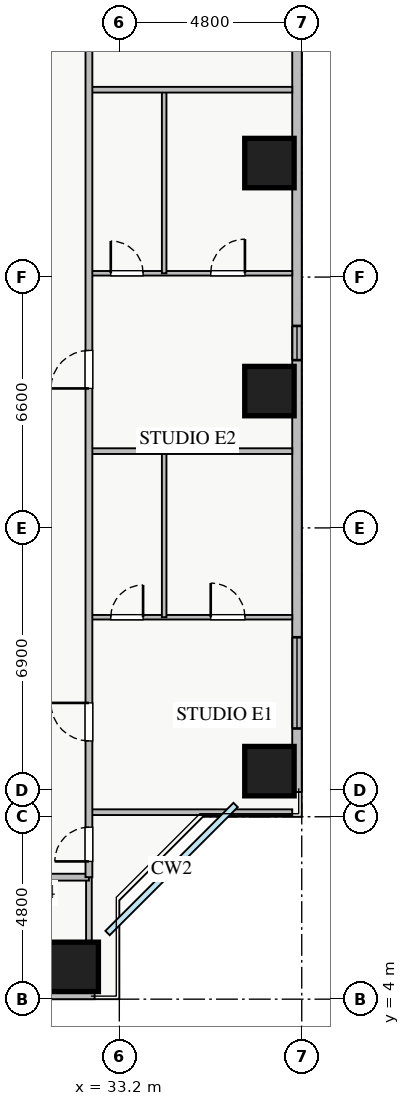
"""IFC4 building model, lengths in metres.
Left out: names, types, materials, properties, quantities, classifications, styles, units other than length and angle.
Written with IfcOpenShell. Run it as: python <this file> out.ifc"""

import sys

from ifc_helpers import new_model, si_unit, direction, frame, frame_2d, origin, origin_2d, place, context, subcontext, project, spatial, rectangle, extrude, source, transform, mapped, element, fill, save


model = new_model("IFC4")
c1 = context("Model", 3, precision=1e-05, world=origin(), true_north=direction((0.0, 1.0)))
c2 = subcontext(c1, "Body", "Model", "MODEL_VIEW")
j1 = project(units=[si_unit("LENGTHUNIT", "METRE"), si_unit("PLANEANGLEUNIT", "RADIAN")], contexts=[c1])
p1 = place(None, origin())
s1 = spatial("IfcSite", under=j1, at=p1, CompositionType="ELEMENT")
p2 = place(p1, origin())
s2 = spatial("IfcBuilding", under=s1, at=p2, CompositionType="ELEMENT")
p3 = place(p2, frame((0.0, 0.0, 50.25)))
s3 = spatial("IfcBuildingStorey", under=s2, at=p3, CompositionType="ELEMENT", Elevation=50.25)
m1 = source(origin(), c2, "Body", "SweptSolid", [
    extrude(rectangle(XDim=1.3, YDim=1.3, at=origin_2d()), origin(), (0.0, 0.0, 1.0), 3.25),
])
for number, where, z_axis, x_axis in (
    (1, (32.0, 4.85, 0.0), (0.0, 0.0, 1.0), (1.0, 0.0, 0.0)),
    (2, (37.15, 10.0, 0.0), (0.0, 0.0, 1.0), (1.0, 0.0, 0.0)),
    (3, (37.15, 20.0, 0.0), (0.0, 0.0, 1.0), (1.0, 0.0, 0.0)),
    (4, (37.15, 26.0, 0.0), (0.0, 0.0, 1.0), (1.0, 0.0, 0.0)),
):
    element("IfcColumn", number, at=place(p3, frame(where, z_axis=z_axis, x_axis=x_axis)), inside=s3, PredefinedType="COLUMN", context=c2, shape_type="MappedRepresentation", body=[
        mapped(m1, transform((0.0, 0.0, 0.0), x_axis=(1.0, 0.0, 0.0), y_axis=(0.0, 1.0, 0.0), z_axis=(0.0, 0.0, 1.0), scale=1.0)),
    ])
p4 = place(p3, frame((5.45, 4.125, 0.0), z_axis=(0.0, 0.0, 1.0), x_axis=(1.0, 0.0, 0.0)))
e5 = element("IfcWall", 5, at=p4, inside=s3, PredefinedType="STANDARD", context=c2, shape_type="SweptSolid", body=[
    extrude(rectangle(XDim=27.1, YDim=0.25, at=frame_2d((13.55, 0.0))), origin(), (0.0, 0.0, 1.0), 2.61),
])
p5 = place(p4, frame((14.4, 0.0, 0.0)))
e6 = element("IfcOpeningElement", 6, at=p5, cuts=e5, PredefinedType="OPENING", context=c2, shape_type="SweptSolid", body=[
    extrude(rectangle(XDim=1.2, YDim=2.1, at=frame_2d((0.6, 1.05))), frame((0.0, 0.135, 0.0), z_axis=(0.0, -1.0, 0.0), x_axis=(1.0, 0.0, 0.0)), (0.0, 0.0, 1.0), 0.27),
])
p6 = place(p4, frame((1.5, 0.0, 0.9)))
e7 = element("IfcOpeningElement", 7, at=p6, cuts=e5, PredefinedType="OPENING", context=c2, shape_type="SweptSolid", body=[
    extrude(rectangle(XDim=1.5, YDim=1.5, at=frame_2d((0.75, 0.75))), frame((0.0, 0.135, 0.0), z_axis=(0.0, -1.0, 0.0), x_axis=(1.0, 0.0, 0.0)), (0.0, 0.0, 1.0), 0.27),
])
p7 = place(p4, frame((9.263, 0.0, 0.9)))
e8 = element("IfcOpeningElement", 8, at=p7, cuts=e5, PredefinedType="OPENING", context=c2, shape_type="SweptSolid", body=[
    extrude(rectangle(XDim=1.8, YDim=1.45, at=frame_2d((0.9, 0.725))), frame((0.0, 0.135, 0.0), z_axis=(0.0, -1.0, 0.0), x_axis=(1.0, 0.0, 0.0)), (0.0, 0.0, 1.0), 0.27),
])
p8 = place(p4, frame((17.95, 0.0, 0.9)))
e9 = element("IfcOpeningElement", 9, at=p8, cuts=e5, PredefinedType="OPENING", context=c2, shape_type="SweptSolid", body=[
    extrude(rectangle(XDim=1.5, YDim=1.5, at=frame_2d((0.75, 0.75))), frame((0.0, 0.135, 0.0), z_axis=(0.0, -1.0, 0.0), x_axis=(1.0, 0.0, 0.0)), (0.0, 0.0, 1.0), 0.27),
])
p9 = place(p4, frame((22.663, 0.0, 0.9)))
e10 = element("IfcOpeningElement", 10, at=p9, cuts=e5, PredefinedType="OPENING", context=c2, shape_type="SweptSolid", body=[
    extrude(rectangle(XDim=2.1, YDim=1.48, at=frame_2d((1.05, 0.74))), frame((0.0, 0.135, 0.0), z_axis=(0.0, -1.0, 0.0), x_axis=(1.0, 0.0, 0.0)), (0.0, 0.0, 1.0), 0.27),
])
p10 = place(p4, frame((4.71, 0.0, 0.9)))
e11 = element("IfcOpeningElement", 11, at=p10, cuts=e5, PredefinedType="OPENING", context=c2, shape_type="SweptSolid", body=[
    extrude(rectangle(XDim=2.4, YDim=1.5, at=frame_2d((1.2, 0.75))), frame((0.0, 0.135, 0.0), z_axis=(0.0, -1.0, 0.0), x_axis=(1.0, 0.0, 0.0)), (0.0, 0.0, 1.0), 0.27),
])
p11 = place(p3, frame((37.875, 9.45, 0.0), z_axis=(0.0, 0.0, 1.0), x_axis=(0.0, 1.0, 0.0)))
e12 = element("IfcWall", 12, at=p11, inside=s3, PredefinedType="STANDARD", context=c2, shape_type="SweptSolid", body=[
    extrude(rectangle(XDim=27.1, YDim=0.25, at=frame_2d((13.55, 0.0))), origin(), (0.0, 0.0, 1.0), 2.61),
])
p12 = place(p11, frame((1.673, 0.0, 0.9)))
e13 = element("IfcOpeningElement", 13, at=p12, cuts=e12, PredefinedType="OPENING", context=c2, shape_type="SweptSolid", body=[
    extrude(rectangle(XDim=2.4, YDim=1.5, at=frame_2d((1.2, 0.75))), frame((0.0, 0.135, 0.0), z_axis=(0.0, -1.0, 0.0), x_axis=(1.0, 0.0, 0.0)), (0.0, 0.0, 1.0), 0.27),
])
p13 = place(p11, frame((23.788, 0.0, 0.9)))
e14 = element("IfcOpeningElement", 14, at=p13, cuts=e12, PredefinedType="OPENING", context=c2, shape_type="SweptSolid", body=[
    extrude(rectangle(XDim=1.8, YDim=1.5, at=frame_2d((0.9, 0.75))), frame((0.0, 0.135, 0.0), z_axis=(0.0, -1.0, 0.0), x_axis=(1.0, 0.0, 0.0)), (0.0, 0.0, 1.0), 0.27),
])
p14 = place(p11, frame((19.758, 0.0, 0.9)))
e15 = element("IfcOpeningElement", 15, at=p14, cuts=e12, PredefinedType="OPENING", context=c2, shape_type="SweptSolid", body=[
    extrude(rectangle(XDim=2.4, YDim=1.5, at=frame_2d((1.2, 0.75))), frame((0.0, 0.135, 0.0), z_axis=(0.0, -1.0, 0.0), x_axis=(1.0, 0.0, 0.0)), (0.0, 0.0, 1.0), 0.27),
])
p15 = place(p11, frame((11.365, 0.0, 0.9)))
e16 = element("IfcOpeningElement", 16, at=p15, cuts=e12, PredefinedType="OPENING", context=c2, shape_type="SweptSolid", body=[
    extrude(rectangle(XDim=0.9, YDim=1.2, at=frame_2d((0.45, 0.6))), frame((0.0, 0.135, 0.0), z_axis=(0.0, -1.0, 0.0), x_axis=(1.0, 0.0, 0.0)), (0.0, 0.0, 1.0), 0.27),
])
p16 = place(p3, frame((32.4, 4.25, 0.0), z_axis=(0.0, 0.0, 1.0), x_axis=(0.0, 1.0, 0.0)))
e17 = element("IfcWall", 17, at=p16, inside=s3, PredefinedType="PARTITIONING", context=c2, shape_type="SweptSolid", body=[
    extrude(rectangle(XDim=2.96, YDim=0.15, at=frame_2d((1.48, 0.0))), origin(), (0.0, 0.0, 1.0), 3.07),
])
p17 = place(p3, frame((8.82, 7.21, 0.0), z_axis=(0.0, 0.0, 1.0), x_axis=(1.0, 0.0, 0.0)))
e18 = element("IfcWall", 18, at=p17, inside=s3, PredefinedType="PARTITIONING", context=c2, shape_type="SweptSolid", body=[
    extrude(rectangle(XDim=23.58, YDim=0.18, at=frame_2d((11.79, 0.0))), origin(), (0.0, 0.0, 1.0), 3.07),
])
p18 = place(p17, frame((2.04, 0.0, 0.0)))
e19 = element("IfcOpeningElement", 19, at=p18, cuts=e18, PredefinedType="OPENING", context=c2, shape_type="SweptSolid", body=[
    extrude(rectangle(XDim=1.0, YDim=2.05, at=frame_2d((0.5, 1.025))), frame((0.0, 0.1, 0.0), z_axis=(0.0, -1.0, 0.0), x_axis=(1.0, 0.0, 0.0)), (0.0, 0.0, 1.0), 0.2),
])
p19 = place(p17, frame((8.53, 0.0, 0.0)))
e20 = element("IfcOpeningElement", 20, at=p19, cuts=e18, PredefinedType="OPENING", context=c2, shape_type="SweptSolid", body=[
    extrude(rectangle(XDim=1.0, YDim=2.05, at=frame_2d((0.5, 1.025))), frame((0.0, 0.1, 0.0), z_axis=(0.0, -1.0, 0.0), x_axis=(1.0, 0.0, 0.0)), (0.0, 0.0, 1.0), 0.2),
])
p20 = place(p17, frame((14.83, 0.0, 0.0)))
e21 = element("IfcOpeningElement", 21, at=p20, cuts=e18, PredefinedType="OPENING", context=c2, shape_type="SweptSolid", body=[
    extrude(rectangle(XDim=1.0, YDim=2.05, at=frame_2d((0.5, 1.025))), frame((0.0, 0.1, 0.0), z_axis=(0.0, -1.0, 0.0), x_axis=(1.0, 0.0, 0.0)), (0.0, 0.0, 1.0), 0.2),
])
p21 = place(p17, frame((20.13, 0.0, 0.0)))
e22 = element("IfcOpeningElement", 22, at=p21, cuts=e18, PredefinedType="OPENING", context=c2, shape_type="SweptSolid", body=[
    extrude(rectangle(XDim=1.0, YDim=2.05, at=frame_2d((0.5, 1.025))), frame((0.0, 0.1, 0.0), z_axis=(0.0, -1.0, 0.0), x_axis=(1.0, 0.0, 0.0)), (0.0, 0.0, 1.0), 0.2),
])
p22 = place(p3, frame((32.4, 8.92, 0.0), z_axis=(0.0, 0.0, 1.0), x_axis=(1.0, 0.0, 0.0)))
e23 = element("IfcWall", 23, at=p22, inside=s3, PredefinedType="PARTITIONING", context=c2, shape_type="SweptSolid", body=[
    extrude(rectangle(XDim=5.35, YDim=0.15, at=frame_2d((2.675, 0.0))), origin(), (0.0, 0.0, 1.0), 3.07),
])
p23 = place(p3, frame((32.4, 14.05, 0.0), z_axis=(0.0, 0.0, 1.0), x_axis=(1.0, 0.0, 0.0)))
e24 = element("IfcWall", 24, at=p23, inside=s3, PredefinedType="PLUMBINGWALL", context=c2, shape_type="SweptSolid", body=[
    extrude(rectangle(XDim=5.35, YDim=0.12, at=frame_2d((2.675, 0.0))), origin(), (0.0, 0.0, 1.0), 3.07),
])
p24 = place(p23, frame((0.575, 0.0, 0.0)))
e25 = element("IfcOpeningElement", 25, at=p24, cuts=e24, PredefinedType="OPENING", context=c2, shape_type="SweptSolid", body=[
    extrude(rectangle(XDim=0.85, YDim=2.05, at=frame_2d((0.425, 1.025))), frame((0.0, 0.07, 0.0), z_axis=(0.0, -1.0, 0.0), x_axis=(1.0, 0.0, 0.0)), (0.0, 0.0, 1.0), 0.14),
])
p25 = place(p23, frame((3.205, 0.0, 0.0)))
e26 = element("IfcOpeningElement", 26, at=p25, cuts=e24, PredefinedType="OPENING", context=c2, shape_type="SweptSolid", body=[
    extrude(rectangle(XDim=0.9, YDim=2.05, at=frame_2d((0.45, 1.025))), frame((0.0, 0.07, 0.0), z_axis=(0.0, -1.0, 0.0), x_axis=(1.0, 0.0, 0.0)), (0.0, 0.0, 1.0), 0.14),
])
p26 = place(p3, frame((34.38, 14.05, 0.0), z_axis=(0.0, 0.0, 1.0), x_axis=(0.0, 1.0, 0.0)))
e27 = element("IfcWall", 27, at=p26, inside=s3, PredefinedType="PLUMBINGWALL", context=c2, shape_type="SweptSolid", body=[
    extrude(rectangle(XDim=4.37, YDim=0.12, at=frame_2d((2.185, 0.0))), origin(), (0.0, 0.0, 1.0), 3.07),
])
p27 = place(p3, frame((32.4, 23.1, 0.0), z_axis=(0.0, 0.0, 1.0), x_axis=(1.0, 0.0, 0.0)))
e28 = element("IfcWall", 28, at=p27, inside=s3, PredefinedType="PLUMBINGWALL", context=c2, shape_type="SweptSolid", body=[
    extrude(rectangle(XDim=5.35, YDim=0.12, at=frame_2d((2.675, 0.0))), origin(), (0.0, 0.0, 1.0), 3.07),
])
p28 = place(p27, frame((0.575, 0.0, 0.0)))
e29 = element("IfcOpeningElement", 29, at=p28, cuts=e28, PredefinedType="OPENING", context=c2, shape_type="SweptSolid", body=[
    extrude(rectangle(XDim=0.85, YDim=2.05, at=frame_2d((0.425, 1.025))), frame((0.0, 0.07, 0.0), z_axis=(0.0, -1.0, 0.0), x_axis=(1.0, 0.0, 0.0)), (0.0, 0.0, 1.0), 0.14),
])
p29 = place(p27, frame((3.205, 0.0, 0.0)))
e30 = element("IfcOpeningElement", 30, at=p29, cuts=e28, PredefinedType="OPENING", context=c2, shape_type="SweptSolid", body=[
    extrude(rectangle(XDim=0.9, YDim=2.05, at=frame_2d((0.45, 1.025))), frame((0.0, 0.07, 0.0), z_axis=(0.0, -1.0, 0.0), x_axis=(1.0, 0.0, 0.0)), (0.0, 0.0, 1.0), 0.14),
])
p30 = place(p3, frame((34.38, 23.1, 0.0), z_axis=(0.0, 0.0, 1.0), x_axis=(0.0, 1.0, 0.0)))
e31 = element("IfcWall", 31, at=p30, inside=s3, PredefinedType="PLUMBINGWALL", context=c2, shape_type="SweptSolid", body=[
    extrude(rectangle(XDim=4.83, YDim=0.12, at=frame_2d((2.415, 0.0))), origin(), (0.0, 0.0, 1.0), 3.07),
])
for number, where, z_axis, x_axis in (
    (32, (32.4, 18.42, 0.0), (0.0, 0.0, 1.0), (1.0, 0.0, 0.0)),
    (33, (32.4, 27.93, 0.0), (0.0, 0.0, 1.0), (1.0, 0.0, 0.0)),
):
    element("IfcWall", number, at=place(p3, frame(where, z_axis=z_axis, x_axis=x_axis)), inside=s3, PredefinedType="PARTITIONING", context=c2, shape_type="SweptSolid", body=[
        extrude(rectangle(XDim=5.35, YDim=0.15, at=frame_2d((2.675, 0.0))), origin(), (0.0, 0.0, 1.0), 2.821),
    ])
p31 = place(p3, frame((32.4, 7.21, 0.0), z_axis=(0.0, 0.0, 1.0), x_axis=(0.0, 1.0, 0.0)))
e34 = element("IfcWall", 34, at=p31, inside=s3, PredefinedType="PARTITIONING", context=c2, shape_type="SweptSolid", body=[
    extrude(rectangle(XDim=31.23, YDim=0.18, at=frame_2d((15.615, 0.0))), origin(), (0.0, 0.0, 1.0), 2.765),
])
p32 = place(p31, frame((30.09, 0.0, 0.0)))
e35 = element("IfcOpeningElement", 35, at=p32, cuts=e34, PredefinedType="OPENING", context=c2, shape_type="SweptSolid", body=[
    extrude(rectangle(XDim=0.9, YDim=2.05, at=frame_2d((0.45, 1.025))), frame((0.0, 0.1, 0.0), z_axis=(0.0, -1.0, 0.0), x_axis=(1.0, 0.0, 0.0)), (0.0, 0.0, 1.0), 0.2),
])
p33 = place(p31, frame((0.415, 0.0, 0.0)))
e36 = element("IfcOpeningElement", 36, at=p33, cuts=e34, PredefinedType="OPENING", context=c2, shape_type="SweptSolid", body=[
    extrude(rectangle(XDim=0.9, YDim=2.05, at=frame_2d((0.45, 1.025))), frame((0.0, 0.1, 0.0), z_axis=(0.0, -1.0, 0.0), x_axis=(1.0, 0.0, 0.0)), (0.0, 0.0, 1.0), 0.2),
])
p34 = place(p31, frame((3.585, 0.0, 0.0)))
e37 = element("IfcOpeningElement", 37, at=p34, cuts=e34, PredefinedType="OPENING", context=c2, shape_type="SweptSolid", body=[
    extrude(rectangle(XDim=1.0, YDim=2.05, at=frame_2d((0.5, 1.025))), frame((0.0, 0.1, 0.0), z_axis=(0.0, -1.0, 0.0), x_axis=(1.0, 0.0, 0.0)), (0.0, 0.0, 1.0), 0.2),
])
p35 = place(p31, frame((12.86, 0.0, 0.0)))
e38 = element("IfcOpeningElement", 38, at=p35, cuts=e34, PredefinedType="OPENING", context=c2, shape_type="SweptSolid", body=[
    extrude(rectangle(XDim=1.0, YDim=2.05, at=frame_2d((0.5, 1.025))), frame((0.0, 0.1, 0.0), z_axis=(0.0, -1.0, 0.0), x_axis=(1.0, 0.0, 0.0)), (0.0, 0.0, 1.0), 0.2),
])
p36 = place(p31, frame((22.5, 0.0, 0.0)))
e39 = element("IfcOpeningElement", 39, at=p36, cuts=e34, PredefinedType="OPENING", context=c2, shape_type="SweptSolid", body=[
    extrude(rectangle(XDim=1.0, YDim=2.05, at=frame_2d((0.5, 1.025))), frame((0.0, 0.1, 0.0), z_axis=(0.0, -1.0, 0.0), x_axis=(1.0, 0.0, 0.0)), (0.0, 0.0, 1.0), 0.2),
])
m2 = source(origin(), c2, "Body", "SweptSolid", [
    extrude(rectangle(XDim=2.4, YDim=1.5, at=frame_2d((1.2, 0.75))), frame((0.0, 0.03, 0.0), z_axis=(0.0, -1.0, 0.0), x_axis=(1.0, 0.0, 0.0)), (0.0, 0.0, 1.0), 0.06),
])
p37 = place(p12, origin())
e40 = element("IfcWindow", 40, at=p37, inside=s3, PartitioningType="TRIPLE_PANEL_VERTICAL", PredefinedType="WINDOW", context=c2, shape_type="MappedRepresentation", body=[
    mapped(m2, transform((0.0, 0.0, 0.0), x_axis=(1.0, 0.0, 0.0), y_axis=(0.0, 1.0, 0.0), z_axis=(0.0, 0.0, 1.0), scale=1.0)),
])
fill(e13, e40)
m3 = source(origin(), c2, "Body", "SweptSolid", [
    extrude(rectangle(XDim=0.85, YDim=2.05, at=frame_2d((0.425, 1.025))), frame((0.0, 0.025, 0.0), z_axis=(0.0, -1.0, 0.0), x_axis=(1.0, 0.0, 0.0)), (0.0, 0.0, 1.0), 0.05),
])
p38 = place(p24, origin())
e41 = element("IfcDoor", 41, at=p38, inside=s3, OperationType="SINGLE_SWING_RIGHT", PredefinedType="DOOR", context=c2, shape_type="MappedRepresentation", body=[
    mapped(m3, transform((0.0, 0.0, 0.0), x_axis=(1.0, 0.0, 0.0), y_axis=(0.0, 1.0, 0.0), z_axis=(0.0, 0.0, 1.0), scale=1.0)),
])
fill(e25, e41)
m4 = source(origin(), c2, "Body", "SweptSolid", [
    extrude(rectangle(XDim=0.9, YDim=2.05, at=frame_2d((0.45, 1.025))), frame((0.0, 0.025, 0.0), z_axis=(0.0, -1.0, 0.0), x_axis=(1.0, 0.0, 0.0)), (0.0, 0.0, 1.0), 0.05),
])
p39 = place(p25, origin())
e42 = element("IfcDoor", 42, at=p39, inside=s3, OperationType="SINGLE_SWING_LEFT", PredefinedType="DOOR", context=c2, shape_type="MappedRepresentation", body=[
    mapped(m4, transform((0.0, 0.0, 0.0), x_axis=(1.0, 0.0, 0.0), y_axis=(0.0, 1.0, 0.0), z_axis=(0.0, 0.0, 1.0), scale=1.0)),
])
fill(e26, e42)
p40 = place(p28, origin())
e43 = element("IfcDoor", 43, at=p40, inside=s3, OperationType="SINGLE_SWING_LEFT", PredefinedType="DOOR", context=c2, shape_type="MappedRepresentation", body=[
    mapped(m3, transform((0.0, 0.0, 0.0), x_axis=(1.0, 0.0, 0.0), y_axis=(0.0, 1.0, 0.0), z_axis=(0.0, 0.0, 1.0), scale=1.0)),
])
fill(e29, e43)
p41 = place(p29, origin())
e44 = element("IfcDoor", 44, at=p41, inside=s3, OperationType="SINGLE_SWING_RIGHT", PredefinedType="DOOR", context=c2, shape_type="MappedRepresentation", body=[
    mapped(m4, transform((0.0, 0.0, 0.0), x_axis=(1.0, 0.0, 0.0), y_axis=(0.0, 1.0, 0.0), z_axis=(0.0, 0.0, 1.0), scale=1.0)),
])
fill(e30, e44)
p42 = place(p33, origin())
e45 = element("IfcDoor", 45, at=p42, inside=s3, OperationType="SINGLE_SWING_LEFT", PredefinedType="DOOR", context=c2, shape_type="MappedRepresentation", body=[
    mapped(m4, transform((0.0, 0.0, 0.0), x_axis=(1.0, 0.0, 0.0), y_axis=(0.0, 1.0, 0.0), z_axis=(0.0, 0.0, 1.0), scale=1.0)),
])
fill(e36, e45)
m5 = source(origin(), c2, "Body", "SweptSolid", [
    extrude(rectangle(XDim=1.0, YDim=2.05, at=frame_2d((0.5, 1.025))), frame((0.0, 0.025, 0.0), z_axis=(0.0, -1.0, 0.0), x_axis=(1.0, 0.0, 0.0)), (0.0, 0.0, 1.0), 0.05),
])
p43 = place(p34, origin())
e46 = element("IfcDoor", 46, at=p43, inside=s3, OperationType="SINGLE_SWING_RIGHT", PredefinedType="DOOR", context=c2, shape_type="MappedRepresentation", body=[
    mapped(m5, transform((0.0, 0.0, 0.0), x_axis=(1.0, 0.0, 0.0), y_axis=(0.0, 1.0, 0.0), z_axis=(0.0, 0.0, 1.0), scale=1.0)),
])
fill(e37, e46)
p44 = place(p35, origin())
e47 = element("IfcDoor", 47, at=p44, inside=s3, OperationType="SINGLE_SWING_LEFT", PredefinedType="DOOR", context=c2, shape_type="MappedRepresentation", body=[
    mapped(m5, transform((0.0, 0.0, 0.0), x_axis=(1.0, 0.0, 0.0), y_axis=(0.0, 1.0, 0.0), z_axis=(0.0, 0.0, 1.0), scale=1.0)),
])
fill(e38, e47)
m6 = source(origin(), c2, "Body", "SweptSolid", [
    extrude(rectangle(XDim=0.9, YDim=1.2, at=frame_2d((0.45, 0.6))), frame((0.0, 0.03, 0.0), z_axis=(0.0, -1.0, 0.0), x_axis=(1.0, 0.0, 0.0)), (0.0, 0.0, 1.0), 0.06),
])
p45 = place(p15, origin())
e48 = element("IfcWindow", 48, at=p45, inside=s3, PartitioningType="SINGLE_PANEL", PredefinedType="WINDOW", context=c2, shape_type="MappedRepresentation", body=[
    mapped(m6, transform((0.0, 0.0, 0.0), x_axis=(1.0, 0.0, 0.0), y_axis=(0.0, 1.0, 0.0), z_axis=(0.0, 0.0, 1.0), scale=1.0)),
])
fill(e16, e48)
save(model, sys.argv[1])
